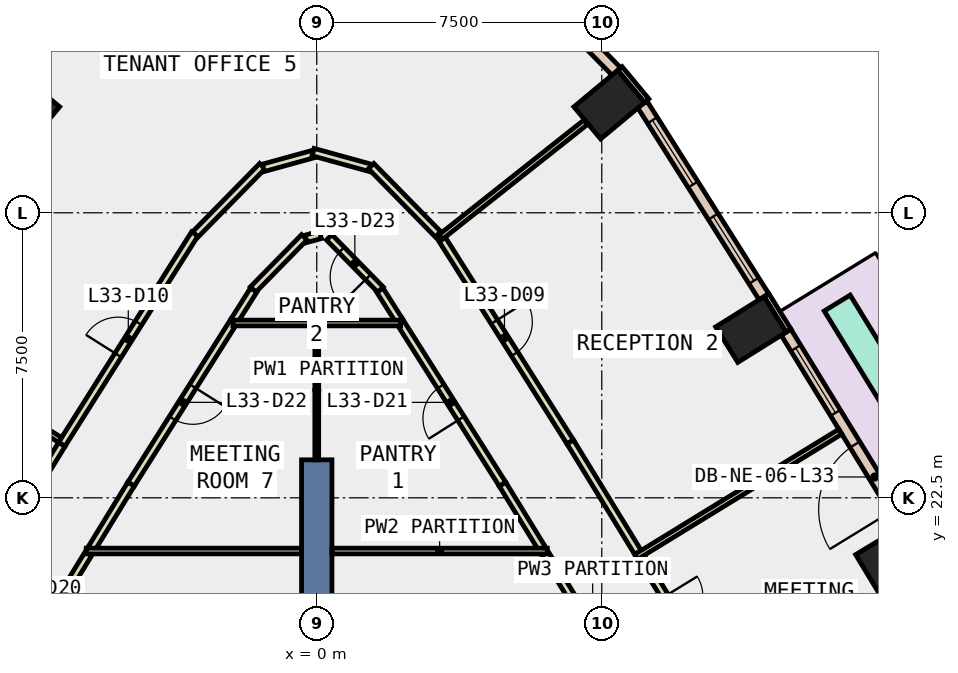
"""IFC4 building model, lengths in metres.
Left out: names, types, materials, properties, quantities, classifications, styles, units other than length and angle.
Written with IfcOpenShell. Run it as: python <this file> out.ifc"""

import sys

from ifc_helpers import new_model, si_unit, direction, frame, frame_2d, origin, origin_2d, place, context, subcontext, project, spatial, rectangle, extrude, element, fill, save


model = new_model("IFC4")
c1 = context("Model", 3, precision=1e-05, world=origin(), true_north=direction((0.0, 1.0)))
c2 = subcontext(c1, "Body", "Model", "MODEL_VIEW")
j1 = project(units=[si_unit("LENGTHUNIT", "METRE"), si_unit("PLANEANGLEUNIT", "RADIAN")], contexts=[c1])
p1 = place(None, origin())
s1 = spatial("IfcSite", under=j1, at=p1, CompositionType="ELEMENT")
p2 = place(p1, origin())
s2 = spatial("IfcBuilding", under=s1, at=p2, CompositionType="ELEMENT")
p3 = place(p2, frame((0.0, 0.0, 150.8)))
s3 = spatial("IfcBuildingStorey", under=s2, at=p3, CompositionType="ELEMENT", Elevation=150.8)
for number, where, z_axis, x_axis in (
    (1, (15.107, 20.923, -0.4), (0.0, 0.0, 1.0), (-0.518, 0.855, 0.0)),
    (2, (11.425, 26.928, -0.4), (0.0, 0.0, 1.0), (-0.53, 0.848, 0.0)),
    (3, (7.695, 32.845, -0.4), (0.0, 0.0, 1.0), (-0.639, 0.769, 0.0)),
    (4, (-7.695, 32.845, -0.4), (0.0, 0.0, 1.0), (0.639, 0.769, 0.0)),
):
    element("IfcColumn", number, at=place(p3, frame(where, z_axis=z_axis, x_axis=x_axis)), inside=s3, PredefinedType="COLUMN", context=c2, shape_type="SweptSolid", body=[
        extrude(rectangle(XDim=1.1, YDim=1.5, at=origin_2d()), origin(), (0.0, 0.0, 1.0), 4.2),
    ])
p4 = place(p3, frame((0.0, 14.5, -0.4), z_axis=(0.0, 0.0, 1.0), x_axis=(0.0, 1.0, 0.0)))
e5 = element("IfcWall", 5, at=p4, inside=s3, PredefinedType="SHEAR", context=c2, shape_type="SweptSolid", body=[
    extrude(rectangle(XDim=9.0, YDim=0.8, at=frame_2d((4.5, 0.0))), origin(), (0.0, 0.0, 1.0), 4.2),
])
p5 = place(p3, frame((12.416, 26.899, 0.0), z_axis=(0.0, 0.0, 1.0), x_axis=(-0.529879262372, 0.848073090782, 0.0)))
e6 = element("IfcWall", 6, at=p5, inside=s3, PredefinedType="STANDARD", context=c2, shape_type="SweptSolid", body=[
    extrude(rectangle(XDim=1.1, YDim=0.15, at=frame_2d((0.55, 0.0))), origin(), (0.0, 0.0, 1.0), 3.8),
])
p6 = place(p3, frame((8.681, 32.949, 0.0), z_axis=(0.0, 0.0, 1.0), x_axis=(-0.639070205934, 0.769148406933, 0.0)))
e7 = element("IfcWall", 7, at=p6, inside=s3, PredefinedType="STANDARD", context=c2, shape_type="SweptSolid", body=[
    extrude(rectangle(XDim=1.1, YDim=0.15, at=frame_2d((0.55, 0.0))), origin(), (0.0, 0.0, 1.0), 3.8),
])
p7 = place(p3, frame((15.462, 21.779, 0.0), z_axis=(0.0, 0.0, 1.0), x_axis=(-0.522704272908, 0.852514072074, 0.0)))
e8 = element("IfcWall", 8, at=p7, inside=s3, PredefinedType="STANDARD", context=c2, shape_type="SweptSolid", body=[
    extrude(rectangle(XDim=5.958, YDim=0.3, at=frame_2d((2.979, 0.0))), origin(), (0.0, 0.0, 1.0), 3.8),
])
p8 = place(p7, frame((0.489, 0.0, 0.0)))
e9 = element("IfcOpeningElement", 9, at=p8, cuts=e8, PredefinedType="OPENING", context=c2, shape_type="SweptSolid", body=[
    extrude(rectangle(XDim=2.0, YDim=2.4, at=frame_2d((1.0, 1.2))), frame((0.0, 0.16, 0.0), z_axis=(0.0, -1.0, 0.0), x_axis=(1.0, 0.0, 0.0)), (0.0, 0.0, 1.0), 0.32),
])
p9 = place(p7, frame((3.468, 0.0, 0.9)))
e10 = element("IfcOpeningElement", 10, at=p9, cuts=e8, PredefinedType="OPENING", context=c2, shape_type="SweptSolid", body=[
    extrude(rectangle(XDim=2.0, YDim=2.6, at=frame_2d((1.0, 1.3))), frame((0.0, 0.16, 0.0), z_axis=(0.0, -1.0, 0.0), x_axis=(1.0, 0.0, 0.0)), (0.0, 0.0, 1.0), 0.32),
])
p10 = place(p3, frame((11.767, 27.79, 0.0), z_axis=(0.0, 0.0, 1.0), x_axis=(-0.534262775953, 0.845318452556, 0.0)))
e11 = element("IfcWall", 11, at=p10, inside=s3, PredefinedType="STANDARD", context=c2, shape_type="SweptSolid", body=[
    extrude(rectangle(XDim=5.992, YDim=0.3, at=frame_2d((2.996, 0.0))), origin(), (0.0, 0.0, 1.0), 3.8),
])
p11 = place(p10, frame((0.498, 0.0, 0.9)))
e12 = element("IfcOpeningElement", 12, at=p11, cuts=e11, PredefinedType="OPENING", context=c2, shape_type="SweptSolid", body=[
    extrude(rectangle(XDim=2.0, YDim=2.6, at=frame_2d((1.0, 1.3))), frame((0.0, 0.16, 0.0), z_axis=(0.0, -1.0, 0.0), x_axis=(1.0, 0.0, 0.0)), (0.0, 0.0, 1.0), 0.32),
])
p12 = place(p10, frame((3.494, 0.0, 0.9)))
e13 = element("IfcOpeningElement", 13, at=p12, cuts=e11, PredefinedType="OPENING", context=c2, shape_type="SweptSolid", body=[
    extrude(rectangle(XDim=2.0, YDim=2.6, at=frame_2d((1.0, 1.3))), frame((0.0, 0.16, 0.0), z_axis=(0.0, -1.0, 0.0), x_axis=(1.0, 0.0, 0.0)), (0.0, 0.0, 1.0), 0.32),
])
p13 = place(p3, frame((7.885, 33.717, 0.0), z_axis=(0.0, 0.0, 1.0), x_axis=(-0.7003170466, 0.713831936973, 0.0)))
e14 = element("IfcWall", 14, at=p13, inside=s3, PredefinedType="STANDARD", context=c2, shape_type="SweptSolid", body=[
    extrude(rectangle(XDim=3.775, YDim=0.3, at=frame_2d((1.888, 0.0))), origin(), (0.0, 0.0, 1.0), 3.8),
])
p14 = place(p13, frame((1.188, 0.0, 0.9)))
e15 = element("IfcOpeningElement", 15, at=p14, cuts=e14, PredefinedType="OPENING", context=c2, shape_type="SweptSolid", body=[
    extrude(rectangle(XDim=1.4, YDim=2.6, at=frame_2d((0.7, 1.3))), frame((0.0, 0.16, 0.0), z_axis=(0.0, -1.0, 0.0), x_axis=(1.0, 0.0, 0.0)), (0.0, 0.0, 1.0), 0.32),
])
p15 = place(p3, frame((-5.241, 36.412, 0.0), z_axis=(0.0, 0.0, 1.0), x_axis=(-0.7003170466, -0.713831936973, 0.0)))
e16 = element("IfcWall", 16, at=p15, inside=s3, PredefinedType="STANDARD", context=c2, shape_type="SweptSolid", body=[
    extrude(rectangle(XDim=3.775, YDim=0.3, at=frame_2d((1.888, 0.0))), origin(), (0.0, 0.0, 1.0), 3.8),
])
p16 = place(p15, frame((1.188, 0.0, 0.9)))
e17 = element("IfcOpeningElement", 17, at=p16, cuts=e16, PredefinedType="OPENING", context=c2, shape_type="SweptSolid", body=[
    extrude(rectangle(XDim=1.4, YDim=2.6, at=frame_2d((0.7, 1.3))), frame((0.0, 0.16, 0.0), z_axis=(0.0, -1.0, 0.0), x_axis=(1.0, 0.0, 0.0)), (0.0, 0.0, 1.0), 0.32),
])
p17 = place(p3, frame((16.757, 22.632, 0.0), z_axis=(0.0, 0.0, 1.0), x_axis=(-0.52278978303, 0.852461637119, 0.0)))
e18 = element("IfcWall", 18, at=p17, inside=s3, PredefinedType="STANDARD", context=c2, shape_type="SweptSolid", body=[
    extrude(rectangle(XDim=5.857, YDim=0.8, at=frame_2d((2.929, 0.0))), origin(), (0.0, 0.0, 1.0), 0.8),
])
p18 = place(p3, frame((8.516, 16.942, 0.0), z_axis=(0.0, 0.0, 1.0), x_axis=(-0.522865983217, 0.852414901086, 0.0)))
e19 = element("IfcWall", 19, at=p18, inside=s3, PredefinedType="PARTITIONING", context=c2, shape_type="SweptSolid", body=[
    extrude(rectangle(XDim=4.803, YDim=0.2, at=frame_2d((2.401, 0.0))), origin(), (0.0, 0.0, 1.0), 3.8),
])
p19 = place(p18, frame((1.901, 0.0, 0.0)))
e20 = element("IfcOpeningElement", 20, at=p19, cuts=e19, PredefinedType="OPENING", context=c2, shape_type="SweptSolid", body=[
    extrude(rectangle(XDim=1.0, YDim=2.1, at=frame_2d((0.5, 1.05))), frame((0.0, 0.11, 0.0), z_axis=(0.0, -1.0, 0.0), x_axis=(1.0, 0.0, 0.0)), (0.0, 0.0, 1.0), 0.22),
])
p20 = place(p3, frame((-6.005, 21.036, 0.0), z_axis=(0.0, 0.0, 1.0), x_axis=(-0.522865983217, -0.852414901086, 0.0)))
e21 = element("IfcWall", 21, at=p20, inside=s3, PredefinedType="PARTITIONING", context=c2, shape_type="SweptSolid", body=[
    extrude(rectangle(XDim=4.803, YDim=0.2, at=frame_2d((2.401, 0.0))), origin(), (0.0, 0.0, 1.0), 3.8),
])
p21 = place(p20, frame((1.901, 0.0, 0.0)))
e22 = element("IfcOpeningElement", 22, at=p21, cuts=e21, PredefinedType="OPENING", context=c2, shape_type="SweptSolid", body=[
    extrude(rectangle(XDim=1.0, YDim=2.1, at=frame_2d((0.5, 1.05))), frame((0.0, 0.11, 0.0), z_axis=(0.0, -1.0, 0.0), x_axis=(1.0, 0.0, 0.0)), (0.0, 0.0, 1.0), 0.22),
])
p22 = place(p3, frame((5.927, 21.164, 0.0), z_axis=(0.0, 0.0, 1.0), x_axis=(-0.522754838565, 0.852483066552, 0.0)))
e23 = element("IfcWall", 23, at=p22, inside=s3, PredefinedType="PARTITIONING", context=c2, shape_type="SweptSolid", body=[
    extrude(rectangle(XDim=1.99, YDim=0.2, at=frame_2d((0.995, 0.0))), origin(), (0.0, 0.0, 1.0), 3.8),
])
p23 = place(p3, frame((4.887, 22.86, 0.0), z_axis=(0.0, 0.0, 1.0), x_axis=(-0.534315942524, 0.845284847589, 0.0)))
e24 = element("IfcWall", 24, at=p23, inside=s3, PredefinedType="PARTITIONING", context=c2, shape_type="SweptSolid", body=[
    extrude(rectangle(XDim=5.091, YDim=0.2, at=frame_2d((2.545, 0.0))), origin(), (0.0, 0.0, 1.0), 3.8),
])
p24 = place(p23, frame((2.045, 0.0, 0.0)))
e25 = element("IfcOpeningElement", 25, at=p24, cuts=e24, PredefinedType="OPENING", context=c2, shape_type="SweptSolid", body=[
    extrude(rectangle(XDim=1.0, YDim=2.1, at=frame_2d((0.5, 1.05))), frame((0.0, 0.11, 0.0), z_axis=(0.0, -1.0, 0.0), x_axis=(1.0, 0.0, 0.0)), (0.0, 0.0, 1.0), 0.22),
])
p25 = place(p3, frame((-2.167, 27.163, 0.0), z_axis=(0.0, 0.0, 1.0), x_axis=(-0.534315942524, -0.845284847589, 0.0)))
e26 = element("IfcWall", 26, at=p25, inside=s3, PredefinedType="PARTITIONING", context=c2, shape_type="SweptSolid", body=[
    extrude(rectangle(XDim=5.091, YDim=0.2, at=frame_2d((2.545, 0.0))), origin(), (0.0, 0.0, 1.0), 3.8),
])
p26 = place(p25, frame((2.045, 0.0, 0.0)))
e27 = element("IfcOpeningElement", 27, at=p26, cuts=e26, PredefinedType="OPENING", context=c2, shape_type="SweptSolid", body=[
    extrude(rectangle(XDim=1.0, YDim=2.1, at=frame_2d((0.5, 1.05))), frame((0.0, 0.11, 0.0), z_axis=(0.0, -1.0, 0.0), x_axis=(1.0, 0.0, 0.0)), (0.0, 0.0, 1.0), 0.22),
])
p27 = place(p3, frame((-4.887, 22.86, 0.0), z_axis=(0.0, 0.0, 1.0), x_axis=(-0.522754838565, -0.852483066552, 0.0)))
e28 = element("IfcWall", 28, at=p27, inside=s3, PredefinedType="PARTITIONING", context=c2, shape_type="SweptSolid", body=[
    extrude(rectangle(XDim=1.99, YDim=0.2, at=frame_2d((0.995, 0.0))), origin(), (0.0, 0.0, 1.0), 3.8),
])
p28 = place(p3, frame((2.167, 27.163, 0.0), z_axis=(0.0, 0.0, 1.0), x_axis=(-0.533944629884, 0.845519445204, 0.0)))
e29 = element("IfcWall", 29, at=p28, inside=s3, PredefinedType="PARTITIONING", context=c2, shape_type="SweptSolid", body=[
    extrude(rectangle(XDim=0.95, YDim=0.2, at=frame_2d((0.475, 0.0))), origin(), (0.0, 0.0, 1.0), 3.8),
])
p29 = place(p3, frame((1.677, 27.979, 0.0), z_axis=(0.0, 0.0, 1.0), x_axis=(-0.700357727804, 0.713792023705, 0.0)))
e30 = element("IfcWall", 30, at=p29, inside=s3, PredefinedType="PARTITIONING", context=c2, shape_type="SweptSolid", body=[
    extrude(rectangle(XDim=1.926, YDim=0.2, at=frame_2d((0.963, 0.0))), origin(), (0.0, 0.0, 1.0), 3.8),
])
p30 = place(p29, frame((0.463, 0.0, 0.0)))
e31 = element("IfcOpeningElement", 31, at=p30, cuts=e30, PredefinedType="OPENING", context=c2, shape_type="SweptSolid", body=[
    extrude(rectangle(XDim=1.0, YDim=2.1, at=frame_2d((0.5, 1.05))), frame((0.0, 0.11, 0.0), z_axis=(0.0, -1.0, 0.0), x_axis=(1.0, 0.0, 0.0)), (0.0, 0.0, 1.0), 0.22),
])
p31 = place(p3, frame((0.096, 29.419, 0.0), z_axis=(0.0, 0.0, 1.0), x_axis=(-0.963940323387, -0.266118494187, 0.0)))
e32 = element("IfcWall", 32, at=p31, inside=s3, PredefinedType="PARTITIONING", context=c2, shape_type="SweptSolid", body=[
    extrude(rectangle(XDim=0.413, YDim=0.2, at=frame_2d((0.207, 0.0))), origin(), (0.0, 0.0, 1.0), 3.8),
])
p32 = place(p3, frame((-0.328, 29.354, 0.0), z_axis=(0.0, 0.0, 1.0), x_axis=(-0.700357727804, -0.713792023705, 0.0)))
e33 = element("IfcWall", 33, at=p32, inside=s3, PredefinedType="PARTITIONING", context=c2, shape_type="SweptSolid", body=[
    extrude(rectangle(XDim=1.926, YDim=0.2, at=frame_2d((0.963, 0.0))), origin(), (0.0, 0.0, 1.0), 3.8),
])
p33 = place(p3, frame((-1.66, 27.966, 0.0), z_axis=(0.0, 0.0, 1.0), x_axis=(-0.533944629884, -0.845519445204, 0.0)))
e34 = element("IfcWall", 34, at=p33, inside=s3, PredefinedType="PARTITIONING", context=c2, shape_type="SweptSolid", body=[
    extrude(rectangle(XDim=0.95, YDim=0.2, at=frame_2d((0.475, 0.0))), origin(), (0.0, 0.0, 1.0), 3.8),
])
p34 = place(p3, frame((8.53, 20.935, 0.0), z_axis=(0.0, 0.0, 1.0), x_axis=(0.522830634433, -0.852436582801, 0.0)))
e35 = element("IfcWall", 35, at=p34, inside=s3, PredefinedType="PARTITIONING", context=c2, shape_type="SweptSolid", body=[
    extrude(rectangle(XDim=3.41, YDim=0.2, at=frame_2d((1.705, 0.0))), origin(), (0.0, 0.0, 1.0), 3.8),
])
p35 = place(p34, frame((1.205, 0.0, 0.0)))
e36 = element("IfcOpeningElement", 36, at=p35, cuts=e35, PredefinedType="OPENING", context=c2, shape_type="SweptSolid", body=[
    extrude(rectangle(XDim=1.0, YDim=2.1, at=frame_2d((0.5, 1.05))), frame((0.0, 0.11, 0.0), z_axis=(0.0, -1.0, 0.0), x_axis=(1.0, 0.0, 0.0)), (0.0, 0.0, 1.0), 0.22),
])
p36 = place(p3, frame((3.209, 29.446, 0.0), z_axis=(0.0, 0.0, 1.0), x_axis=(0.534253865926, -0.845324083854, 0.0)))
e37 = element("IfcWall", 37, at=p36, inside=s3, PredefinedType="PARTITIONING", context=c2, shape_type="SweptSolid", body=[
    extrude(rectangle(XDim=6.478, YDim=0.2, at=frame_2d((3.239, 0.0))), origin(), (0.0, 0.0, 1.0), 3.8),
])
p37 = place(p36, frame((2.739, 0.0, 0.0)))
e38 = element("IfcOpeningElement", 38, at=p37, cuts=e37, PredefinedType="OPENING", context=c2, shape_type="SweptSolid", body=[
    extrude(rectangle(XDim=1.0, YDim=2.1, at=frame_2d((0.5, 1.05))), frame((0.0, 0.11, 0.0), z_axis=(0.0, -1.0, 0.0), x_axis=(1.0, 0.0, 0.0)), (0.0, 0.0, 1.0), 0.22),
])
p38 = place(p3, frame((6.67, 23.97, 0.0), z_axis=(0.0, 0.0, 1.0), x_axis=(0.522622501212, -0.85256420358, 0.0)))
e39 = element("IfcWall", 39, at=p38, inside=s3, PredefinedType="PARTITIONING", context=c2, shape_type="SweptSolid", body=[
    extrude(rectangle(XDim=3.41, YDim=0.2, at=frame_2d((1.705, 0.0))), origin(), (0.0, 0.0, 1.0), 3.8),
])
p39 = place(p3, frame((-6.71, 23.906, 0.0), z_axis=(0.0, 0.0, 1.0), x_axis=(0.534211624298, 0.845350779538, 0.0)))
e40 = element("IfcWall", 40, at=p39, inside=s3, PredefinedType="PARTITIONING", context=c2, shape_type="SweptSolid", body=[
    extrude(rectangle(XDim=6.553, YDim=0.2, at=frame_2d((3.277, 0.0))), origin(), (0.0, 0.0, 1.0), 3.8),
])
p40 = place(p39, frame((2.777, 0.0, 0.0)))
e41 = element("IfcOpeningElement", 41, at=p40, cuts=e40, PredefinedType="OPENING", context=c2, shape_type="SweptSolid", body=[
    extrude(rectangle(XDim=1.0, YDim=2.1, at=frame_2d((0.5, 1.05))), frame((0.0, 0.11, 0.0), z_axis=(0.0, -1.0, 0.0), x_axis=(1.0, 0.0, 0.0)), (0.0, 0.0, 1.0), 0.22),
])
p41 = place(p3, frame((-3.192, 29.433, 0.0), z_axis=(0.0, 0.0, 1.0), x_axis=(0.700326668838, 0.713822496783, 0.0)))
e42 = element("IfcWall", 42, at=p41, inside=s3, PredefinedType="PARTITIONING", context=c2, shape_type="SweptSolid", body=[
    extrude(rectangle(XDim=2.514, YDim=0.2, at=frame_2d((1.257, 0.0))), origin(), (0.0, 0.0, 1.0), 3.8),
])
p42 = place(p3, frame((-1.404, 31.183, 0.0), z_axis=(0.0, 0.0, 1.0), x_axis=(0.963995798992, 0.265917467508, 0.0)))
e43 = element("IfcWall", 43, at=p42, inside=s3, PredefinedType="PARTITIONING", context=c2, shape_type="SweptSolid", body=[
    extrude(rectangle(XDim=1.357, YDim=0.2, at=frame_2d((0.678, 0.0))), origin(), (0.0, 0.0, 1.0), 3.8),
])
p43 = place(p3, frame((-0.096, 31.597, 0.0), z_axis=(0.0, 0.0, 1.0), x_axis=(0.963988457226, -0.265944081217, 0.0)))
e44 = element("IfcWall", 44, at=p43, inside=s3, PredefinedType="PARTITIONING", context=c2, shape_type="SweptSolid", body=[
    extrude(rectangle(XDim=1.556, YDim=0.2, at=frame_2d((0.778, 0.0))), origin(), (0.0, 0.0, 1.0), 3.8),
])
p44 = place(p3, frame((1.431, 31.228, 0.0), z_axis=(0.0, 0.0, 1.0), x_axis=(0.700326668838, -0.713822496783, 0.0)))
e45 = element("IfcWall", 45, at=p44, inside=s3, PredefinedType="PARTITIONING", context=c2, shape_type="SweptSolid", body=[
    extrude(rectangle(XDim=2.514, YDim=0.2, at=frame_2d((1.257, 0.0))), origin(), (0.0, 0.0, 1.0), 3.8),
])
p45 = place(p3, frame((-10.313, 18.028, 0.0), z_axis=(0.0, 0.0, 1.0), x_axis=(0.522772968793, 0.85247194857, 0.0)))
e46 = element("IfcWall", 46, at=p45, inside=s3, PredefinedType="PARTITIONING", context=c2, shape_type="SweptSolid", body=[
    extrude(rectangle(XDim=6.894, YDim=0.2, at=frame_2d((3.447, 0.0))), origin(), (0.0, 0.0, 1.0), 3.8),
])
for number, where, z_axis, x_axis in (
    (47, (0.4, 21.1, 0.0), (0.0, 0.0, 1.0), (1.0, 0.0, 0.0)),
    (48, (-6.066, 21.1, 0.0), (0.0, 0.0, 1.0), (1.0, 0.0, 0.0)),
):
    element("IfcWall", number, at=place(p3, frame(where, z_axis=z_axis, x_axis=x_axis)), inside=s3, PredefinedType="PARTITIONING", context=c2, shape_type="SweptSolid", body=[
        extrude(rectangle(XDim=5.666, YDim=0.15, at=frame_2d((2.833, 0.0))), origin(), (0.0, 0.0, 1.0), 3.8),
    ])
p46 = place(p3, frame((0.0, 23.5, 0.0), z_axis=(0.0, 0.0, 1.0), x_axis=(0.0, 1.0, 0.0)))
e49 = element("IfcWall", 49, at=p46, inside=s3, PredefinedType="PARTITIONING", context=c2, shape_type="SweptSolid", body=[
    extrude(rectangle(XDim=3.675, YDim=0.1, at=frame_2d((1.837, 0.0))), origin(), (0.0, 0.0, 1.0), 3.8),
])
for number, where, z_axis, x_axis in (
    (50, (0.05, 27.1, 0.0), (0.0, 0.0, 1.0), (1.0, 0.0, 0.0)),
    (51, (-2.208, 27.1, 0.0), (0.0, 0.0, 1.0), (1.0, 0.0, 0.0)),
):
    element("IfcWall", number, at=place(p3, frame(where, z_axis=z_axis, x_axis=x_axis)), inside=s3, PredefinedType="PARTITIONING", context=c2, shape_type="SweptSolid", body=[
        extrude(rectangle(XDim=2.158, YDim=0.15, at=frame_2d((1.079, 0.0))), origin(), (0.0, 0.0, 1.0), 3.8),
    ])
p47 = place(p3, frame((8.406, 20.947, 0.0), z_axis=(0.0, 0.0, 1.0), x_axis=(0.852529956042, 0.522678365777, 0.0)))
e52 = element("IfcWall", 52, at=p47, inside=s3, PredefinedType="PARTITIONING", context=c2, shape_type="SweptSolid", body=[
    extrude(rectangle(XDim=6.3, YDim=0.15, at=frame_2d((3.15, 0.0))), origin(), (0.0, 0.0, 1.0), 3.8),
])
p48 = place(p3, frame((3.262, 29.362, 0.0), z_axis=(0.0, 0.0, 1.0), x_axis=(0.78403972141, 0.620710653406, 0.0)))
e53 = element("IfcWall", 53, at=p48, inside=s3, PredefinedType="PARTITIONING", context=c2, shape_type="SweptSolid", body=[
    extrude(rectangle(XDim=4.867, YDim=0.15, at=frame_2d((2.434, 0.0))), origin(), (0.0, 0.0, 1.0), 3.8),
])
p49 = place(p3, frame((-6.755, 24.023, 0.0), z_axis=(0.0, 0.0, 1.0), x_axis=(-0.848896034983, 0.528559856392, 0.0)))
e54 = element("IfcWall", 54, at=p49, inside=s3, PredefinedType="PARTITIONING", context=c2, shape_type="SweptSolid", body=[
    extrude(rectangle(XDim=4.73, YDim=0.15, at=frame_2d((2.365, 0.0))), origin(), (0.0, 0.0, 1.0), 3.8),
])
p50 = place(p8, origin())
e55 = element("IfcDoor", 55, at=p50, inside=s3, OperationType="SLIDING_TO_LEFT", PredefinedType="DOOR", context=c2, shape_type="SweptSolid", body=[
    extrude(rectangle(XDim=2.0, YDim=2.4, at=frame_2d((1.0, 1.2))), frame((0.0, 0.025, 0.0), z_axis=(0.0, -1.0, 0.0), x_axis=(1.0, 0.0, 0.0)), (0.0, 0.0, 1.0), 0.05),
])
fill(e9, e55)
p51 = place(p9, origin())
e56 = element("IfcWindow", 56, at=p51, inside=s3, PartitioningType="SINGLE_PANEL", PredefinedType="WINDOW", context=c2, shape_type="SweptSolid", body=[
    extrude(rectangle(XDim=2.0, YDim=2.6, at=frame_2d((1.0, 1.3))), frame((0.0, 0.03, 0.0), z_axis=(0.0, -1.0, 0.0), x_axis=(1.0, 0.0, 0.0)), (0.0, 0.0, 1.0), 0.06),
])
fill(e10, e56)
p52 = place(p11, origin())
e57 = element("IfcWindow", 57, at=p52, inside=s3, PartitioningType="SINGLE_PANEL", PredefinedType="WINDOW", context=c2, shape_type="SweptSolid", body=[
    extrude(rectangle(XDim=2.0, YDim=2.6, at=frame_2d((1.0, 1.3))), frame((0.0, 0.03, 0.0), z_axis=(0.0, -1.0, 0.0), x_axis=(1.0, 0.0, 0.0)), (0.0, 0.0, 1.0), 0.06),
])
fill(e12, e57)
p53 = place(p12, origin())
e58 = element("IfcWindow", 58, at=p53, inside=s3, PartitioningType="SINGLE_PANEL", PredefinedType="WINDOW", context=c2, shape_type="SweptSolid", body=[
    extrude(rectangle(XDim=2.0, YDim=2.6, at=frame_2d((1.0, 1.3))), frame((0.0, 0.03, 0.0), z_axis=(0.0, -1.0, 0.0), x_axis=(1.0, 0.0, 0.0)), (0.0, 0.0, 1.0), 0.06),
])
fill(e13, e58)
p54 = place(p37, origin())
e59 = element("IfcDoor", 59, at=p54, inside=s3, OperationType="SINGLE_SWING_LEFT", PredefinedType="DOOR", context=c2, shape_type="SweptSolid", body=[
    extrude(rectangle(XDim=1.0, YDim=2.1, at=frame_2d((0.5, 1.05))), frame((0.0, 0.025, 0.0), z_axis=(0.0, -1.0, 0.0), x_axis=(1.0, 0.0, 0.0)), (0.0, 0.0, 1.0), 0.05),
])
fill(e38, e59)
p55 = place(p40, origin())
e60 = element("IfcDoor", 60, at=p55, inside=s3, OperationType="SINGLE_SWING_LEFT", PredefinedType="DOOR", context=c2, shape_type="SweptSolid", body=[
    extrude(rectangle(XDim=1.0, YDim=2.1, at=frame_2d((0.5, 1.05))), frame((0.0, 0.025, 0.0), z_axis=(0.0, -1.0, 0.0), x_axis=(1.0, 0.0, 0.0)), (0.0, 0.0, 1.0), 0.05),
])
fill(e41, e60)
p56 = place(p24, origin())
e61 = element("IfcDoor", 61, at=p56, inside=s3, OperationType="SINGLE_SWING_LEFT", PredefinedType="DOOR", context=c2, shape_type="SweptSolid", body=[
    extrude(rectangle(XDim=1.0, YDim=2.1, at=frame_2d((0.5, 1.05))), frame((0.0, 0.025, 0.0), z_axis=(0.0, -1.0, 0.0), x_axis=(1.0, 0.0, 0.0)), (0.0, 0.0, 1.0), 0.05),
])
fill(e25, e61)
p57 = place(p26, origin())
e62 = element("IfcDoor", 62, at=p57, inside=s3, OperationType="SINGLE_SWING_LEFT", PredefinedType="DOOR", context=c2, shape_type="SweptSolid", body=[
    extrude(rectangle(XDim=1.0, YDim=2.1, at=frame_2d((0.5, 1.05))), frame((0.0, 0.025, 0.0), z_axis=(0.0, -1.0, 0.0), x_axis=(1.0, 0.0, 0.0)), (0.0, 0.0, 1.0), 0.05),
])
fill(e27, e62)
p58 = place(p30, origin())
e63 = element("IfcDoor", 63, at=p58, inside=s3, OperationType="SINGLE_SWING_LEFT", PredefinedType="DOOR", context=c2, shape_type="SweptSolid", body=[
    extrude(rectangle(XDim=1.0, YDim=2.1, at=frame_2d((0.5, 1.05))), frame((0.0, 0.025, 0.0), z_axis=(0.0, -1.0, 0.0), x_axis=(1.0, 0.0, 0.0)), (0.0, 0.0, 1.0), 0.05),
])
fill(e31, e63)
save(model, sys.argv[1])
